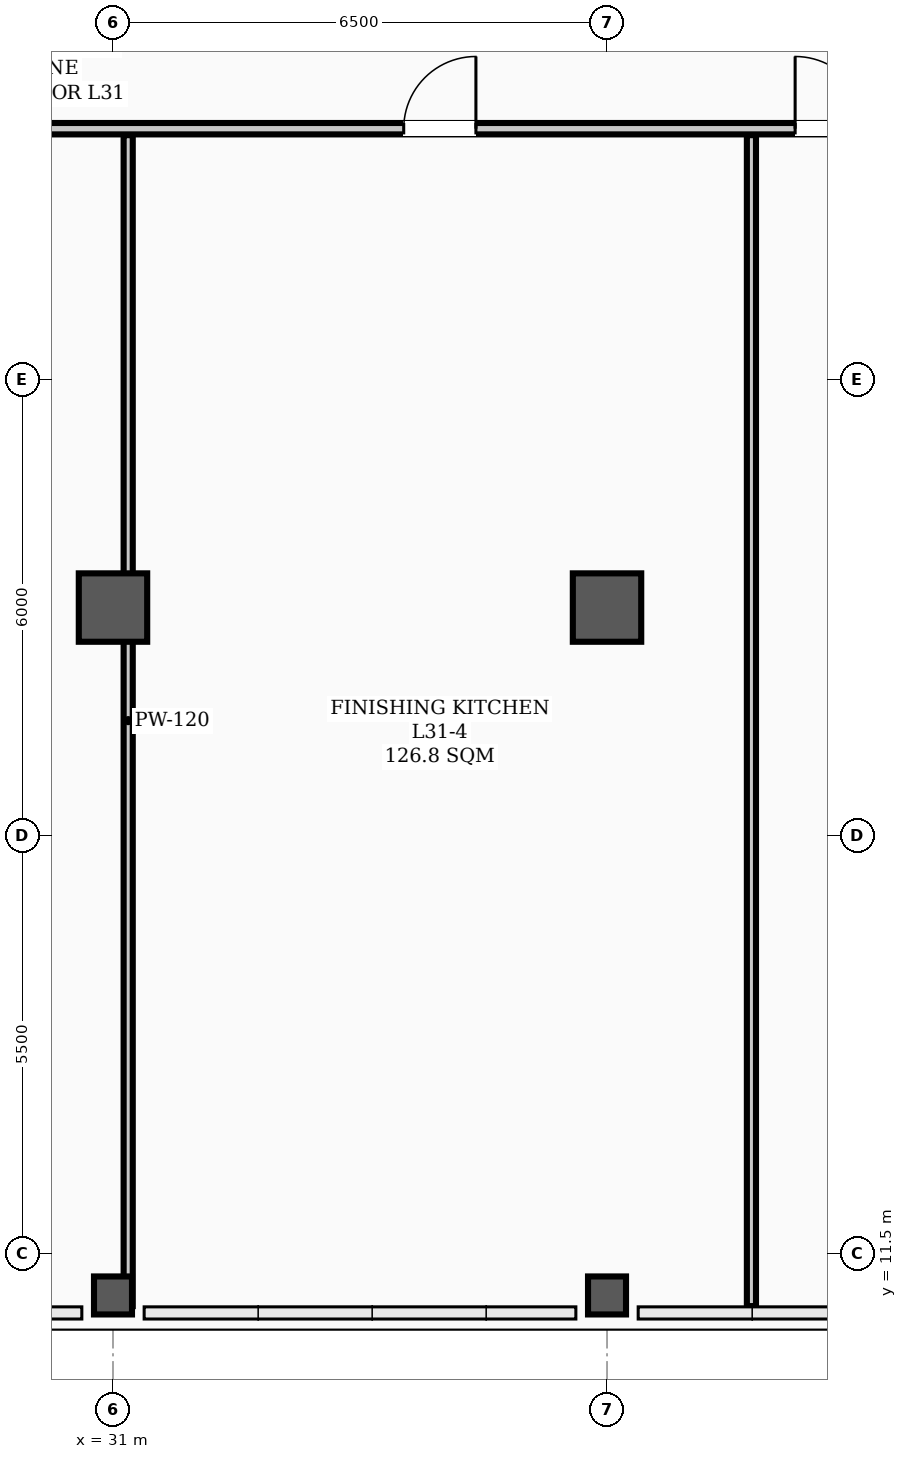
"""IFC4 building model, lengths in metres.
Left out: names, types, materials, properties, quantities, classifications, styles, units other than length and angle.
Written with IfcOpenShell. Run it as: python <this file> out.ifc"""

import sys

from ifc_helpers import new_model, si_unit, direction, frame, frame_2d, origin, origin_2d, place, context, subcontext, project, spatial, rectangle, hollow_rectangle, extrude, element, fill, save


model = new_model("IFC4")
c1 = context("Model", 3, precision=1e-05, world=origin(), true_north=direction((0.0, 1.0)))
c2 = subcontext(c1, "Body", "Model", "MODEL_VIEW")
j1 = project(units=[si_unit("LENGTHUNIT", "METRE"), si_unit("PLANEANGLEUNIT", "RADIAN")], contexts=[c1])
p1 = place(None, origin())
s1 = spatial("IfcSite", under=j1, at=p1, CompositionType="ELEMENT")
p2 = place(p1, origin())
s2 = spatial("IfcBuilding", under=s1, at=p2, CompositionType="ELEMENT")
p3 = place(p2, frame((0.0, 0.0, 126.6)))
s3 = spatial("IfcBuildingStorey", under=s2, at=p3, CompositionType="ELEMENT", Elevation=126.6)
for number, where, z_axis, x_axis in (
    (1, (31.0, 20.0, 0.0), (0.0, 0.0, 1.0), (1.0, 0.0, 0.0)),
    (2, (37.5, 20.0, 0.0), (0.0, 0.0, 1.0), (1.0, 0.0, 0.0)),
):
    element("IfcColumn", number, at=place(p3, frame(where, z_axis=z_axis, x_axis=x_axis)), inside=s3, PredefinedType="COLUMN", context=c2, shape_type="SweptSolid", body=[
        extrude(hollow_rectangle(XDim=0.9, YDim=0.9, WallThickness=0.035, InnerFilletRadius=0.017, OuterFilletRadius=0.052, at=origin_2d()), origin(), (0.0, 0.0, 1.0), 3.9),
    ])
for number, where, z_axis, x_axis in (
    (3, (31.0, 10.95, 0.0), (0.0, 0.0, 1.0), (1.0, 0.0, 0.0)),
    (4, (37.5, 10.95, 0.0), (0.0, 0.0, 1.0), (1.0, 0.0, 0.0)),
):
    element("IfcColumn", number, at=place(p3, frame(where, z_axis=z_axis, x_axis=x_axis)), inside=s3, PredefinedType="COLUMN", context=c2, shape_type="SweptSolid", body=[
        extrude(hollow_rectangle(XDim=0.5, YDim=0.5, WallThickness=0.024, InnerFilletRadius=0.012, OuterFilletRadius=0.036, at=origin_2d()), origin(), (0.0, 0.0, 1.0), 3.9),
    ])
p4 = place(p3, frame((2.31, 26.3, 0.0), z_axis=(0.0, 0.0, 1.0), x_axis=(1.0, 0.0, 0.0)))
e5 = element("IfcWall", 5, at=p4, inside=s3, PredefinedType="PARTITIONING", context=c2, shape_type="SweptSolid", body=[
    extrude(rectangle(XDim=46.38, YDim=0.15, at=frame_2d((23.19, 0.0))), origin(), (0.0, 0.0, 1.0), 3.1),
])
p5 = place(p4, frame((10.19, 0.0, 0.0)))
e6 = element("IfcOpeningElement", 6, at=p5, cuts=e5, PredefinedType="OPENING", context=c2, shape_type="SweptSolid", body=[
    extrude(rectangle(XDim=0.95, YDim=2.08, at=frame_2d((0.475, 1.04))), frame((0.0, 0.085, 0.0), z_axis=(0.0, -1.0, 0.0), x_axis=(1.0, 0.0, 0.0)), (0.0, 0.0, 1.0), 0.17),
])
p6 = place(p4, frame((15.915, 0.0, 0.0)))
e7 = element("IfcOpeningElement", 7, at=p6, cuts=e5, PredefinedType="OPENING", context=c2, shape_type="SweptSolid", body=[
    extrude(rectangle(XDim=0.95, YDim=2.08, at=frame_2d((0.475, 1.04))), frame((0.0, 0.085, 0.0), z_axis=(0.0, -1.0, 0.0), x_axis=(1.0, 0.0, 0.0)), (0.0, 0.0, 1.0), 0.17),
])
p7 = place(p4, frame((24.115, 0.0, 0.0)))
e8 = element("IfcOpeningElement", 8, at=p7, cuts=e5, PredefinedType="OPENING", context=c2, shape_type="SweptSolid", body=[
    extrude(rectangle(XDim=0.95, YDim=2.08, at=frame_2d((0.475, 1.04))), frame((0.0, 0.085, 0.0), z_axis=(0.0, -1.0, 0.0), x_axis=(1.0, 0.0, 0.0)), (0.0, 0.0, 1.0), 0.17),
])
p8 = place(p4, frame((32.515, 0.0, 0.0)))
e9 = element("IfcOpeningElement", 9, at=p8, cuts=e5, PredefinedType="OPENING", context=c2, shape_type="SweptSolid", body=[
    extrude(rectangle(XDim=0.95, YDim=2.08, at=frame_2d((0.475, 1.04))), frame((0.0, 0.085, 0.0), z_axis=(0.0, -1.0, 0.0), x_axis=(1.0, 0.0, 0.0)), (0.0, 0.0, 1.0), 0.17),
])
p9 = place(p4, frame((37.665, 0.0, 0.0)))
e10 = element("IfcOpeningElement", 10, at=p9, cuts=e5, PredefinedType="OPENING", context=c2, shape_type="SweptSolid", body=[
    extrude(rectangle(XDim=0.95, YDim=2.08, at=frame_2d((0.475, 1.04))), frame((0.0, 0.085, 0.0), z_axis=(0.0, -1.0, 0.0), x_axis=(1.0, 0.0, 0.0)), (0.0, 0.0, 1.0), 0.17),
])
for number, where, z_axis, x_axis in (
    (11, (31.2, 10.81, 0.0), (0.0, 0.0, 1.0), (0.0, 1.0, 0.0)),
    (12, (39.4, 10.81, 0.0), (0.0, 0.0, 1.0), (0.0, 1.0, 0.0)),
):
    element("IfcWall", number, at=place(p3, frame(where, z_axis=z_axis, x_axis=x_axis)), inside=s3, PredefinedType="PARTITIONING", context=c2, shape_type="SweptSolid", body=[
        extrude(rectangle(XDim=15.405, YDim=0.12, at=frame_2d((7.703, 0.0))), origin(), (0.0, 0.0, 1.0), 3.0),
    ])
p10 = place(p8, origin())
e13 = element("IfcDoor", 13, at=p10, inside=s3, OperationType="SINGLE_SWING_RIGHT", PredefinedType="DOOR", context=c2, shape_type="SweptSolid", body=[
    extrude(rectangle(XDim=0.95, YDim=2.08, at=frame_2d((0.475, 1.04))), frame((0.0, 0.025, 0.0), z_axis=(0.0, -1.0, 0.0), x_axis=(1.0, 0.0, 0.0)), (0.0, 0.0, 1.0), 0.05),
])
fill(e9, e13)
p11 = place(p9, origin())
e14 = element("IfcDoor", 14, at=p11, inside=s3, OperationType="SINGLE_SWING_LEFT", PredefinedType="DOOR", context=c2, shape_type="SweptSolid", body=[
    extrude(rectangle(XDim=0.95, YDim=2.08, at=frame_2d((0.475, 1.04))), frame((0.0, 0.025, 0.0), z_axis=(0.0, -1.0, 0.0), x_axis=(1.0, 0.0, 0.0)), (0.0, 0.0, 1.0), 0.05),
])
fill(e10, e14)
save(model, sys.argv[1])
